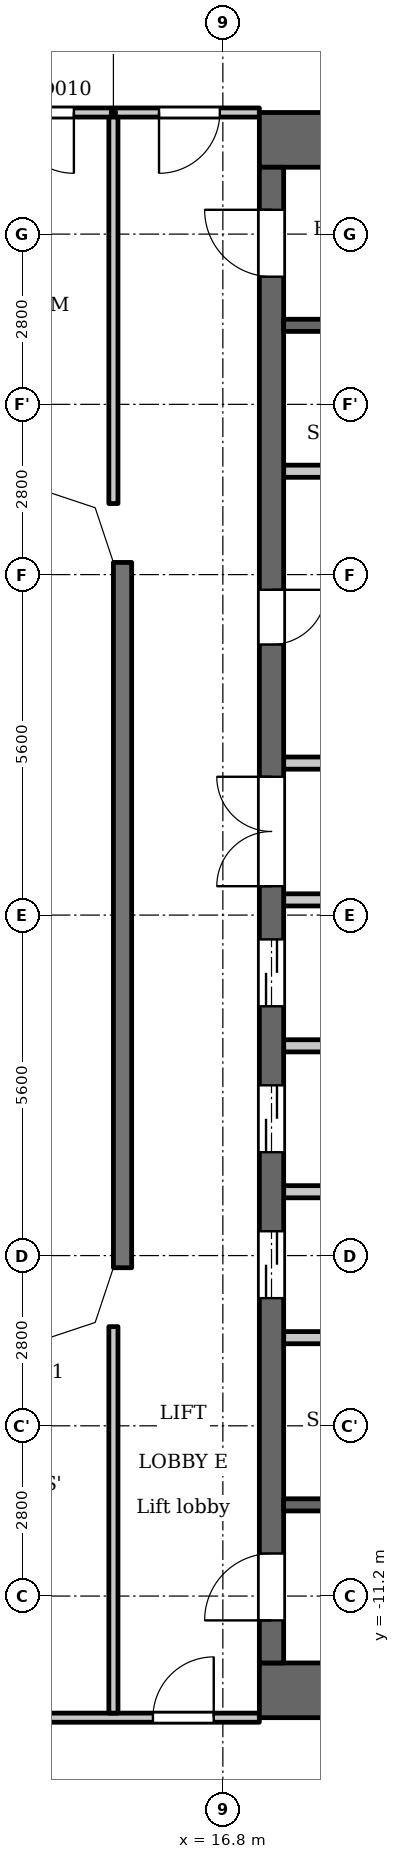
"""IFC4 building model, lengths in metres.
Left out: names, types, materials, properties, quantities, classifications, styles, units other than length and angle.
Written with IfcOpenShell. Run it as: python <this file> out.ifc"""

import sys

from ifc_helpers import new_model, si_unit, direction, frame, frame_2d, origin, place, context, subcontext, project, spatial, polyline, rectangle, outline, extrude, element, fill, save


model = new_model("IFC4")
c1 = context("Model", 3, precision=1e-05, world=origin(), true_north=direction((0.0, 1.0)))
c2 = subcontext(c1, "Body", "Model", "MODEL_VIEW")
j1 = project(units=[si_unit("LENGTHUNIT", "METRE"), si_unit("PLANEANGLEUNIT", "RADIAN")], contexts=[c1])
p1 = place(None, origin())
s1 = spatial("IfcSite", under=j1, at=p1, CompositionType="ELEMENT")
p2 = place(p1, origin())
s2 = spatial("IfcBuilding", under=s1, at=p2, CompositionType="ELEMENT")
p3 = place(p2, frame((0.0, 0.0, 34.0)))
s3 = spatial("IfcBuildingStorey", under=s2, at=p3, CompositionType="ELEMENT", Elevation=34.0)
p4 = place(p3, frame((15.15, 5.8, 0.0), z_axis=(0.0, 0.0, 1.0), x_axis=(0.0, -1.0, 0.0)))
e1 = element("IfcWall", 1, at=p4, inside=s3, PredefinedType="SOLIDWALL", context=c2, shape_type="SweptSolid", body=[
    extrude(rectangle(XDim=11.6, YDim=0.3, at=frame_2d((5.8, 0.0))), origin(), (0.0, 0.0, 1.0), 3.2),
])
for number, where, z_axis, x_axis in (
    (2, (17.4, 12.75, 0.0), (0.0, 0.0, 1.0), (1.0, 0.0, 0.0)),
    (3, (17.4, -12.75, 0.0), (0.0, 0.0, 1.0), (1.0, 0.0, 0.0)),
):
    element("IfcWall", number, at=place(p3, frame(where, z_axis=z_axis, x_axis=x_axis)), inside=s3, PredefinedType="SHEAR", context=c2, shape_type="SweptSolid", body=[
        extrude(rectangle(XDim=10.4, YDim=0.9, at=frame_2d((5.2, 0.0))), origin(), (0.0, 0.0, 1.0), 3.2),
    ])
p5 = place(p3, frame((17.6, -12.3, 0.0), z_axis=(0.0, 0.0, 1.0), x_axis=(0.0, 1.0, 0.0)))
e4 = element("IfcWall", 4, at=p5, inside=s3, PredefinedType="SHEAR", context=c2, shape_type="SweptSolid", body=[
    extrude(rectangle(XDim=24.6, YDim=0.4, at=frame_2d((12.3, 0.0))), origin(), (0.0, 0.0, 1.0), 3.2),
])
p6 = place(p5, frame((6.0, 0.0, 0.0)))
e5 = element("IfcOpeningElement", 5, at=p6, cuts=e4, PredefinedType="OPENING", context=c2, shape_type="SweptSolid", body=[
    extrude(rectangle(XDim=1.1, YDim=2.1, at=frame_2d((0.55, 1.05))), frame((0.0, 0.21, 0.0), z_axis=(0.0, -1.0, 0.0), x_axis=(1.0, 0.0, 0.0)), (0.0, 0.0, 1.0), 0.42),
])
p7 = place(p5, frame((8.4, 0.0, 0.0)))
e6 = element("IfcOpeningElement", 6, at=p7, cuts=e4, PredefinedType="OPENING", context=c2, shape_type="SweptSolid", body=[
    extrude(rectangle(XDim=1.1, YDim=2.1, at=frame_2d((0.55, 1.05))), frame((0.0, 0.21, 0.0), z_axis=(0.0, -1.0, 0.0), x_axis=(1.0, 0.0, 0.0)), (0.0, 0.0, 1.0), 0.42),
])
p8 = place(p5, frame((10.8, 0.0, 0.0)))
e7 = element("IfcOpeningElement", 7, at=p8, cuts=e4, PredefinedType="OPENING", context=c2, shape_type="SweptSolid", body=[
    extrude(rectangle(XDim=1.1, YDim=2.1, at=frame_2d((0.55, 1.05))), frame((0.0, 0.21, 0.0), z_axis=(0.0, -1.0, 0.0), x_axis=(1.0, 0.0, 0.0)), (0.0, 0.0, 1.0), 0.42),
])
p9 = place(p5, frame((16.75, 0.0, 0.0)))
e8 = element("IfcOpeningElement", 8, at=p9, cuts=e4, PredefinedType="OPENING", context=c2, shape_type="SweptSolid", body=[
    extrude(rectangle(XDim=0.9, YDim=2.1, at=frame_2d((0.45, 1.05))), frame((0.0, 0.21, 0.0), z_axis=(0.0, -1.0, 0.0), x_axis=(1.0, 0.0, 0.0)), (0.0, 0.0, 1.0), 0.42),
])
p10 = place(p5, frame((22.8, 0.0, 0.0)))
e9 = element("IfcOpeningElement", 9, at=p10, cuts=e4, PredefinedType="OPENING", context=c2, shape_type="SweptSolid", body=[
    extrude(rectangle(XDim=1.1, YDim=2.1, at=frame_2d((0.55, 1.05))), frame((0.0, 0.21, 0.0), z_axis=(0.0, -1.0, 0.0), x_axis=(1.0, 0.0, 0.0)), (0.0, 0.0, 1.0), 0.42),
])
p11 = place(p5, frame((0.7, 0.0, 0.0)))
e10 = element("IfcOpeningElement", 10, at=p11, cuts=e4, PredefinedType="OPENING", context=c2, shape_type="SweptSolid", body=[
    extrude(rectangle(XDim=1.1, YDim=2.1, at=frame_2d((0.55, 1.05))), frame((0.0, 0.21, 0.0), z_axis=(0.0, -1.0, 0.0), x_axis=(1.0, 0.0, 0.0)), (0.0, 0.0, 1.0), 0.42),
])
p12 = place(p5, frame((12.775, 0.0, 0.0)))
e11 = element("IfcOpeningElement", 11, at=p12, cuts=e4, PredefinedType="OPENING", context=c2, shape_type="SweptSolid", body=[
    extrude(rectangle(XDim=1.8, YDim=2.1, at=frame_2d((0.9, 1.05))), frame((0.0, 0.21, 0.0), z_axis=(0.0, -1.0, 0.0), x_axis=(1.0, 0.0, 0.0)), (0.0, 0.0, 1.0), 0.42),
])
p13 = place(p3, frame((17.8, -9.7, 0.0), z_axis=(0.0, 0.0, 1.0), x_axis=(1.0, 0.0, 0.0)))
e12 = element("IfcWall", 12, at=p13, inside=s3, PredefinedType="SHEAR", context=c2, shape_type="SweptSolid", body=[
    extrude(rectangle(XDim=8.3, YDim=0.2, at=frame_2d((4.15, 0.0))), origin(), (0.0, 0.0, 1.0), 3.2),
])
p14 = place(p13, frame((0.85, 0.0, 0.0)))
e13 = element("IfcOpeningElement", 13, at=p14, cuts=e12, PredefinedType="OPENING", context=c2, shape_type="SweptSolid", body=[
    extrude(rectangle(XDim=1.1, YDim=2.1, at=frame_2d((0.55, 1.05))), frame((0.0, 0.11, 0.0), z_axis=(0.0, -1.0, 0.0), x_axis=(1.0, 0.0, 0.0)), (0.0, 0.0, 1.0), 0.22),
])
p15 = place(p13, frame((3.75, 0.0, 0.0)))
e14 = element("IfcOpeningElement", 14, at=p15, cuts=e12, PredefinedType="OPENING", context=c2, shape_type="SweptSolid", body=[
    extrude(rectangle(XDim=1.1, YDim=2.1, at=frame_2d((0.55, 1.05))), frame((0.0, 0.11, 0.0), z_axis=(0.0, -1.0, 0.0), x_axis=(1.0, 0.0, 0.0)), (0.0, 0.0, 1.0), 0.22),
])
for number, where, z_axis, x_axis in (
    (15, (17.8, -6.95, 0.0), (0.0, 0.0, 1.0), (1.0, 0.0, 0.0)),
    (16, (17.8, -4.55, 0.0), (0.0, 0.0, 1.0), (1.0, 0.0, 0.0)),
    (17, (17.8, -2.15, 0.0), (0.0, 0.0, 1.0), (1.0, 0.0, 0.0)),
):
    element("IfcWall", number, at=place(p3, frame(where, z_axis=z_axis, x_axis=x_axis)), inside=s3, PredefinedType="PARTITIONING", context=c2, shape_type="SweptSolid", body=[
        extrude(rectangle(XDim=2.8, YDim=0.2, at=frame_2d((1.4, 0.0))), origin(), (0.0, 0.0, 1.0), 3.2),
    ])
for number, where, z_axis, x_axis in (
    (18, (17.8, 0.25, 0.0), (0.0, 0.0, 1.0), (1.0, 0.0, 0.0)),
    (19, (17.8, 2.5, 0.0), (0.0, 0.0, 1.0), (1.0, 0.0, 0.0)),
):
    element("IfcWall", number, at=place(p3, frame(where, z_axis=z_axis, x_axis=x_axis)), inside=s3, PredefinedType="PARTITIONING", context=c2, shape_type="SweptSolid", body=[
        extrude(rectangle(XDim=3.0, YDim=0.2, at=frame_2d((1.5, 0.0))), origin(), (0.0, 0.0, 1.0), 3.2),
    ])
p16 = place(p3, frame((17.8, 7.3, 0.0), z_axis=(0.0, 0.0, 1.0), x_axis=(1.0, 0.0, 0.0)))
e20 = element("IfcWall", 20, at=p16, inside=s3, PredefinedType="PARTITIONING", context=c2, shape_type="SweptSolid", body=[
    extrude(rectangle(XDim=2.8, YDim=0.2, at=frame_2d((1.4, 0.0))), origin(), (0.0, 0.0, 1.0), 3.2),
])
p17 = place(p3, frame((17.8, 9.7, 0.0), z_axis=(0.0, 0.0, 1.0), x_axis=(1.0, 0.0, 0.0)))
e21 = element("IfcWall", 21, at=p17, inside=s3, PredefinedType="SHEAR", context=c2, shape_type="SweptSolid", body=[
    extrude(rectangle(XDim=8.3, YDim=0.2, at=frame_2d((4.15, 0.0))), origin(), (0.0, 0.0, 1.0), 3.2),
])
p18 = place(p17, frame((0.85, 0.0, 0.0)))
e22 = element("IfcOpeningElement", 22, at=p18, cuts=e21, PredefinedType="OPENING", context=c2, shape_type="SweptSolid", body=[
    extrude(rectangle(XDim=1.1, YDim=2.1, at=frame_2d((0.55, 1.05))), frame((0.0, 0.11, 0.0), z_axis=(0.0, -1.0, 0.0), x_axis=(1.0, 0.0, 0.0)), (0.0, 0.0, 1.0), 0.22),
])
p19 = place(p17, frame((3.75, 0.0, 0.0)))
e23 = element("IfcOpeningElement", 23, at=p19, cuts=e21, PredefinedType="OPENING", context=c2, shape_type="SweptSolid", body=[
    extrude(rectangle(XDim=1.1, YDim=2.1, at=frame_2d((0.55, 1.05))), frame((0.0, 0.11, 0.0), z_axis=(0.0, -1.0, 0.0), x_axis=(1.0, 0.0, 0.0)), (0.0, 0.0, 1.0), 0.22),
])
p20 = place(p3, frame((-17.4, -13.2, 0.0), z_axis=(0.0, 0.0, 1.0), x_axis=(1.0, 0.0, 0.0)))
e24 = element("IfcWall", 24, at=p20, inside=s3, PredefinedType="PARTITIONING", context=c2, shape_type="SweptSolid", body=[
    extrude(rectangle(XDim=34.8, YDim=0.15, at=frame_2d((17.4, 0.0))), origin(), (0.0, 0.0, 1.0), 3.2),
])
p21 = place(p20, frame((0.65, 0.0, 0.0)))
e25 = element("IfcOpeningElement", 25, at=p21, cuts=e24, PredefinedType="OPENING", context=c2, shape_type="SweptSolid", body=[
    extrude(rectangle(XDim=1.0, YDim=2.1, at=frame_2d((0.5, 1.05))), frame((0.0, 0.085, 0.0), z_axis=(0.0, -1.0, 0.0), x_axis=(1.0, 0.0, 0.0)), (0.0, 0.0, 1.0), 0.17),
])
p22 = place(p20, frame((33.05, 0.0, 0.0)))
e26 = element("IfcOpeningElement", 26, at=p22, cuts=e24, PredefinedType="OPENING", context=c2, shape_type="SweptSolid", body=[
    extrude(rectangle(XDim=1.0, YDim=2.1, at=frame_2d((0.5, 1.05))), frame((0.0, 0.085, 0.0), z_axis=(0.0, -1.0, 0.0), x_axis=(1.0, 0.0, 0.0)), (0.0, 0.0, 1.0), 0.17),
])
p23 = place(p20, frame((4.55, 0.0, 0.0)))
e27 = element("IfcOpeningElement", 27, at=p23, cuts=e24, PredefinedType="OPENING", context=c2, shape_type="SweptSolid", body=[
    extrude(rectangle(XDim=1.0, YDim=2.1, at=frame_2d((0.5, 1.05))), frame((0.0, 0.085, 0.0), z_axis=(0.0, -1.0, 0.0), x_axis=(1.0, 0.0, 0.0)), (0.0, 0.0, 1.0), 0.17),
])
p24 = place(p20, frame((6.9, 0.0, 0.0)))
e28 = element("IfcOpeningElement", 28, at=p24, cuts=e24, PredefinedType="OPENING", context=c2, shape_type="SweptSolid", body=[
    extrude(rectangle(XDim=1.0, YDim=2.1, at=frame_2d((0.5, 1.05))), frame((0.0, 0.085, 0.0), z_axis=(0.0, -1.0, 0.0), x_axis=(1.0, 0.0, 0.0)), (0.0, 0.0, 1.0), 0.17),
])
p25 = place(p20, frame((15.75, 0.0, 0.0)))
e29 = element("IfcOpeningElement", 29, at=p25, cuts=e24, PredefinedType="OPENING", context=c2, shape_type="SweptSolid", body=[
    extrude(rectangle(XDim=1.0, YDim=2.1, at=frame_2d((0.5, 1.05))), frame((0.0, 0.085, 0.0), z_axis=(0.0, -1.0, 0.0), x_axis=(1.0, 0.0, 0.0)), (0.0, 0.0, 1.0), 0.17),
])
p26 = place(p20, frame((18.1, 0.0, 0.0)))
e30 = element("IfcOpeningElement", 30, at=p26, cuts=e24, PredefinedType="OPENING", context=c2, shape_type="SweptSolid", body=[
    extrude(rectangle(XDim=1.0, YDim=2.1, at=frame_2d((0.5, 1.05))), frame((0.0, 0.085, 0.0), z_axis=(0.0, -1.0, 0.0), x_axis=(1.0, 0.0, 0.0)), (0.0, 0.0, 1.0), 0.17),
])
p27 = place(p20, frame((26.95, 0.0, 0.0)))
e31 = element("IfcOpeningElement", 31, at=p27, cuts=e24, PredefinedType="OPENING", context=c2, shape_type="SweptSolid", body=[
    extrude(rectangle(XDim=1.0, YDim=2.1, at=frame_2d((0.5, 1.05))), frame((0.0, 0.085, 0.0), z_axis=(0.0, -1.0, 0.0), x_axis=(1.0, 0.0, 0.0)), (0.0, 0.0, 1.0), 0.17),
])
p28 = place(p20, frame((29.25, 0.0, 0.0)))
e32 = element("IfcOpeningElement", 32, at=p28, cuts=e24, PredefinedType="OPENING", context=c2, shape_type="SweptSolid", body=[
    extrude(rectangle(XDim=1.0, YDim=2.1, at=frame_2d((0.5, 1.05))), frame((0.0, 0.085, 0.0), z_axis=(0.0, -1.0, 0.0), x_axis=(1.0, 0.0, 0.0)), (0.0, 0.0, 1.0), 0.17),
])
p29 = place(p3, frame((-17.4, 13.2, 0.0), z_axis=(0.0, 0.0, 1.0), x_axis=(1.0, 0.0, 0.0)))
e33 = element("IfcWall", 33, at=p29, inside=s3, PredefinedType="PARTITIONING", context=c2, shape_type="SweptSolid", body=[
    extrude(rectangle(XDim=34.8, YDim=0.15, at=frame_2d((17.4, 0.0))), origin(), (0.0, 0.0, 1.0), 3.2),
])
p30 = place(p29, frame((0.75, 0.0, 0.0)))
e34 = element("IfcOpeningElement", 34, at=p30, cuts=e33, PredefinedType="OPENING", context=c2, shape_type="SweptSolid", body=[
    extrude(rectangle(XDim=1.0, YDim=2.1, at=frame_2d((0.5, 1.05))), frame((0.0, 0.085, 0.0), z_axis=(0.0, -1.0, 0.0), x_axis=(1.0, 0.0, 0.0)), (0.0, 0.0, 1.0), 0.17),
])
p31 = place(p29, frame((33.15, 0.0, 0.0)))
e35 = element("IfcOpeningElement", 35, at=p31, cuts=e33, PredefinedType="OPENING", context=c2, shape_type="SweptSolid", body=[
    extrude(rectangle(XDim=1.0, YDim=2.1, at=frame_2d((0.5, 1.05))), frame((0.0, 0.085, 0.0), z_axis=(0.0, -1.0, 0.0), x_axis=(1.0, 0.0, 0.0)), (0.0, 0.0, 1.0), 0.17),
])
p32 = place(p29, frame((3.05, 0.0, 0.0)))
e36 = element("IfcOpeningElement", 36, at=p32, cuts=e33, PredefinedType="OPENING", context=c2, shape_type="SweptSolid", body=[
    extrude(rectangle(XDim=1.0, YDim=2.1, at=frame_2d((0.5, 1.05))), frame((0.0, 0.085, 0.0), z_axis=(0.0, -1.0, 0.0), x_axis=(1.0, 0.0, 0.0)), (0.0, 0.0, 1.0), 0.17),
])
p33 = place(p29, frame((10.1, 0.0, 0.0)))
e37 = element("IfcOpeningElement", 37, at=p33, cuts=e33, PredefinedType="OPENING", context=c2, shape_type="SweptSolid", body=[
    extrude(rectangle(XDim=1.0, YDim=2.1, at=frame_2d((0.5, 1.05))), frame((0.0, 0.085, 0.0), z_axis=(0.0, -1.0, 0.0), x_axis=(1.0, 0.0, 0.0)), (0.0, 0.0, 1.0), 0.17),
])
p34 = place(p29, frame((12.45, 0.0, 0.0)))
e38 = element("IfcOpeningElement", 38, at=p34, cuts=e33, PredefinedType="OPENING", context=c2, shape_type="SweptSolid", body=[
    extrude(rectangle(XDim=1.0, YDim=2.1, at=frame_2d((0.5, 1.05))), frame((0.0, 0.085, 0.0), z_axis=(0.0, -1.0, 0.0), x_axis=(1.0, 0.0, 0.0)), (0.0, 0.0, 1.0), 0.17),
])
p35 = place(p29, frame((21.3, 0.0, 0.0)))
e39 = element("IfcOpeningElement", 39, at=p35, cuts=e33, PredefinedType="OPENING", context=c2, shape_type="SweptSolid", body=[
    extrude(rectangle(XDim=1.0, YDim=2.1, at=frame_2d((0.5, 1.05))), frame((0.0, 0.085, 0.0), z_axis=(0.0, -1.0, 0.0), x_axis=(1.0, 0.0, 0.0)), (0.0, 0.0, 1.0), 0.17),
])
p36 = place(p29, frame((23.65, 0.0, 0.0)))
e40 = element("IfcOpeningElement", 40, at=p36, cuts=e33, PredefinedType="OPENING", context=c2, shape_type="SweptSolid", body=[
    extrude(rectangle(XDim=1.0, YDim=2.1, at=frame_2d((0.5, 1.05))), frame((0.0, 0.085, 0.0), z_axis=(0.0, -1.0, 0.0), x_axis=(1.0, 0.0, 0.0)), (0.0, 0.0, 1.0), 0.17),
])
p37 = place(p29, frame((30.75, 0.0, 0.0)))
e41 = element("IfcOpeningElement", 41, at=p37, cuts=e33, PredefinedType="OPENING", context=c2, shape_type="SweptSolid", body=[
    extrude(rectangle(XDim=1.0, YDim=2.1, at=frame_2d((0.5, 1.05))), frame((0.0, 0.085, 0.0), z_axis=(0.0, -1.0, 0.0), x_axis=(1.0, 0.0, 0.0)), (0.0, 0.0, 1.0), 0.17),
])
for number, where, z_axis, x_axis in (
    (42, (15.0, -13.125, 0.0), (0.0, 0.0, 1.0), (0.0, 1.0, 0.0)),
    (43, (15.0, 6.769, 0.0), (0.0, 0.0, 1.0), (0.0, 1.0, 0.0)),
):
    element("IfcWall", number, at=place(p3, frame(where, z_axis=z_axis, x_axis=x_axis)), inside=s3, PredefinedType="PARTITIONING", context=c2, shape_type="SweptSolid", body=[
        extrude(rectangle(XDim=6.356, YDim=0.15, at=frame_2d((3.178, 0.0))), origin(), (0.0, 0.0, 1.0), 3.2),
    ])
p38 = place(p3, origin())
e44 = element("IfcWall", 44, at=p38, inside=s3, PredefinedType="SOLIDWALL", context=c2, shape_type="SweptSolid", body=[
    extrude(outline(polyline([(14.937, 6.937), (13.849, 7.3), (13.8, 7.3), (13.8, 7.0), (14.7, 6.7), (15.0, 5.8), (15.3, 5.8), (15.3, 5.849), (14.937, 6.937)])), origin(), (0.0, 0.0, 1.0), 3.2),
])
e45 = element("IfcWall", 45, at=p38, inside=s3, PredefinedType="SOLIDWALL", context=c2, shape_type="SweptSolid", body=[
    extrude(outline(polyline([(14.937, -6.937), (15.3, -5.849), (15.3, -5.8), (15.0, -5.8), (14.7, -6.7), (13.8, -7.0), (13.8, -7.3), (13.849, -7.3), (14.937, -6.937)])), origin(), (0.0, 0.0, 1.0), 3.2),
])
p39 = place(p6, origin())
e46 = element("IfcDoor", 46, at=p39, inside=s3, OperationType="DOUBLE_DOOR_SLIDING", PredefinedType="DOOR", context=c2, shape_type="SweptSolid", body=[
    extrude(rectangle(XDim=1.1, YDim=2.1, at=frame_2d((0.55, 1.05))), frame((0.0, 0.025, 0.0), z_axis=(0.0, -1.0, 0.0), x_axis=(1.0, 0.0, 0.0)), (0.0, 0.0, 1.0), 0.05),
])
fill(e5, e46)
p40 = place(p7, origin())
e47 = element("IfcDoor", 47, at=p40, inside=s3, OperationType="DOUBLE_DOOR_SLIDING", PredefinedType="DOOR", context=c2, shape_type="SweptSolid", body=[
    extrude(rectangle(XDim=1.1, YDim=2.1, at=frame_2d((0.55, 1.05))), frame((0.0, 0.025, 0.0), z_axis=(0.0, -1.0, 0.0), x_axis=(1.0, 0.0, 0.0)), (0.0, 0.0, 1.0), 0.05),
])
fill(e6, e47)
p41 = place(p8, origin())
e48 = element("IfcDoor", 48, at=p41, inside=s3, OperationType="DOUBLE_DOOR_SLIDING", PredefinedType="DOOR", context=c2, shape_type="SweptSolid", body=[
    extrude(rectangle(XDim=1.1, YDim=2.1, at=frame_2d((0.55, 1.05))), frame((0.0, 0.025, 0.0), z_axis=(0.0, -1.0, 0.0), x_axis=(1.0, 0.0, 0.0)), (0.0, 0.0, 1.0), 0.05),
])
fill(e7, e48)
p42 = place(p9, origin())
e49 = element("IfcDoor", 49, at=p42, inside=s3, OperationType="SINGLE_SWING_RIGHT", PredefinedType="DOOR", context=c2, shape_type="SweptSolid", body=[
    extrude(rectangle(XDim=0.9, YDim=2.1, at=frame_2d((0.45, 1.05))), frame((0.0, 0.025, 0.0), z_axis=(0.0, -1.0, 0.0), x_axis=(1.0, 0.0, 0.0)), (0.0, 0.0, 1.0), 0.05),
])
fill(e8, e49)
p43 = place(p10, origin())
e50 = element("IfcDoor", 50, at=p43, inside=s3, OperationType="SINGLE_SWING_LEFT", PredefinedType="DOOR", context=c2, shape_type="SweptSolid", body=[
    extrude(rectangle(XDim=1.1, YDim=2.1, at=frame_2d((0.55, 1.05))), frame((0.0, 0.025, 0.0), z_axis=(0.0, -1.0, 0.0), x_axis=(1.0, 0.0, 0.0)), (0.0, 0.0, 1.0), 0.05),
])
fill(e9, e50)
p44 = place(p11, origin())
e51 = element("IfcDoor", 51, at=p44, inside=s3, OperationType="SINGLE_SWING_RIGHT", PredefinedType="DOOR", context=c2, shape_type="SweptSolid", body=[
    extrude(rectangle(XDim=1.1, YDim=2.1, at=frame_2d((0.55, 1.05))), frame((0.0, 0.025, 0.0), z_axis=(0.0, -1.0, 0.0), x_axis=(1.0, 0.0, 0.0)), (0.0, 0.0, 1.0), 0.05),
])
fill(e10, e51)
p45 = place(p12, origin())
e52 = element("IfcDoor", 52, at=p45, inside=s3, OperationType="DOUBLE_DOOR_SINGLE_SWING", PredefinedType="DOOR", context=c2, shape_type="SweptSolid", body=[
    extrude(rectangle(XDim=1.8, YDim=2.1, at=frame_2d((0.9, 1.05))), frame((0.0, 0.025, 0.0), z_axis=(0.0, -1.0, 0.0), x_axis=(1.0, 0.0, 0.0)), (0.0, 0.0, 1.0), 0.05),
])
fill(e11, e52)
p46 = place(p31, origin())
e53 = element("IfcDoor", 53, at=p46, inside=s3, OperationType="SINGLE_SWING_LEFT", PredefinedType="DOOR", context=c2, shape_type="SweptSolid", body=[
    extrude(rectangle(XDim=1.0, YDim=2.1, at=frame_2d((0.5, 1.05))), frame((0.0, 0.025, 0.0), z_axis=(0.0, -1.0, 0.0), x_axis=(1.0, 0.0, 0.0)), (0.0, 0.0, 1.0), 0.05),
])
fill(e35, e53)
p47 = place(p22, origin())
e54 = element("IfcDoor", 54, at=p47, inside=s3, OperationType="SINGLE_SWING_LEFT", PredefinedType="DOOR", context=c2, shape_type="SweptSolid", body=[
    extrude(rectangle(XDim=1.0, YDim=2.1, at=frame_2d((0.5, 1.05))), frame((0.0, 0.025, 0.0), z_axis=(0.0, -1.0, 0.0), x_axis=(1.0, 0.0, 0.0)), (0.0, 0.0, 1.0), 0.05),
])
fill(e26, e54)
p48 = place(p37, origin())
e55 = element("IfcDoor", 55, at=p48, inside=s3, OperationType="SINGLE_SWING_RIGHT", PredefinedType="DOOR", context=c2, shape_type="SweptSolid", body=[
    extrude(rectangle(XDim=1.0, YDim=2.1, at=frame_2d((0.5, 1.05))), frame((0.0, 0.025, 0.0), z_axis=(0.0, -1.0, 0.0), x_axis=(1.0, 0.0, 0.0)), (0.0, 0.0, 1.0), 0.05),
])
fill(e41, e55)
save(model, sys.argv[1])
